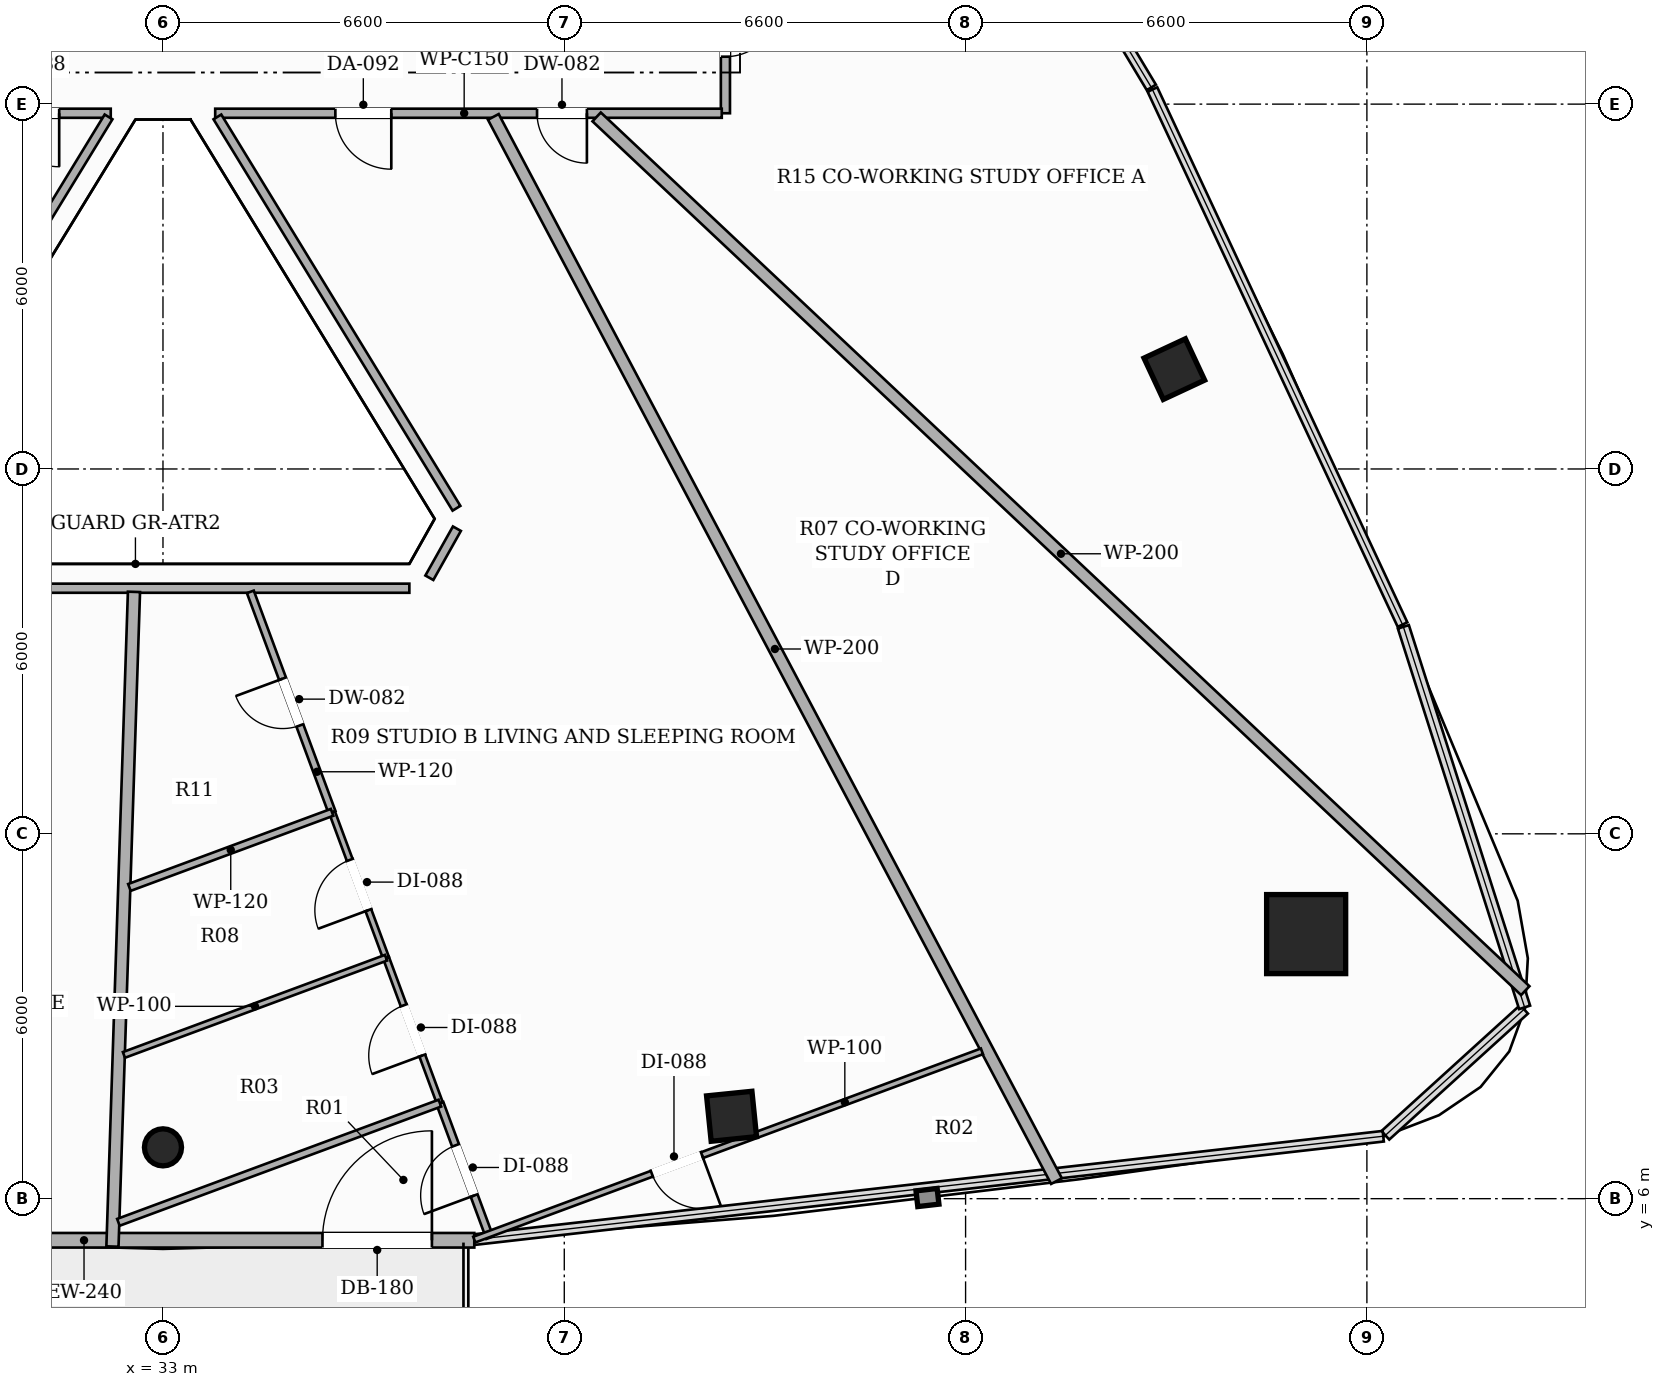
"""IFC4 building model, lengths in metres.
Left out: names, types, materials, properties, quantities, classifications, styles, units other than length and angle.
Written with IfcOpenShell. Run it as: python <this file> out.ifc"""

import sys

from ifc_helpers import new_model, si_unit, direction, frame, frame_2d, origin, origin_2d, place, context, subcontext, project, spatial, rectangle, hollow_rectangle, hollow_circle, extrude, element, fill, save


model = new_model("IFC4")
c1 = context("Model", 3, precision=1e-05, world=origin(), true_north=direction((0.0, 1.0)))
c2 = subcontext(c1, "Body", "Model", "MODEL_VIEW")
j1 = project(units=[si_unit("LENGTHUNIT", "METRE"), si_unit("PLANEANGLEUNIT", "RADIAN")], contexts=[c1])
p1 = place(None, origin())
s1 = spatial("IfcSite", under=j1, at=p1, CompositionType="ELEMENT")
p2 = place(p1, origin())
s2 = spatial("IfcBuilding", under=s1, at=p2, CompositionType="ELEMENT")
p3 = place(p2, frame((0.0, 0.0, 246.95)))
s3 = spatial("IfcBuildingStorey", under=s2, at=p3, CompositionType="ELEMENT", Elevation=246.95)
p4 = place(p3, frame((51.801, 10.351, 0.0), z_axis=(0.0, 0.0, 1.0), x_axis=(1.0, 0.0, 0.0)))
e1 = element("IfcColumn", 1, at=p4, inside=s3, PredefinedType="COLUMN", context=c2, shape_type="SweptSolid", body=[
    extrude(hollow_rectangle(XDim=1.3, YDim=1.3, WallThickness=0.04, at=origin_2d()), origin(), (0.0, 0.0, 1.0), 3.3),
])
p5 = place(p3, frame((33.0, 6.844, 0.0), z_axis=(0.0, 0.0, 1.0), x_axis=(1.0, 0.0, 0.0)))
e2 = element("IfcColumn", 2, at=p5, inside=s3, PredefinedType="COLUMN", context=c2, shape_type="SweptSolid", body=[
    extrude(hollow_circle(Radius=0.305, WallThickness=0.016, at=origin_2d()), origin(), (0.0, 0.0, 1.0), 3.3),
])
for number, where, z_axis, x_axis in (
    (3, (42.351, 7.355, 0.0), (0.0, 0.0, 1.0), (0.995, 0.101, 0.0)),
    (4, (49.633, 19.642, 0.0), (0.0, 0.0, 1.0), (-0.423, 0.906, 0.0)),
):
    element("IfcColumn", number, at=place(p3, frame(where, z_axis=z_axis, x_axis=x_axis)), inside=s3, PredefinedType="COLUMN", context=c2, shape_type="SweptSolid", body=[
        extrude(hollow_rectangle(XDim=0.75, YDim=0.75, WallThickness=0.025, at=origin_2d()), origin(), (0.0, 0.0, 1.0), 3.3),
    ])
p6 = place(p3, frame((27.88, 5.316, 0.0), z_axis=(0.0, 0.0, 1.0), x_axis=(1.0, 0.0, 0.0)))
e5 = element("IfcWall", 5, at=p6, inside=s3, PredefinedType="SOLIDWALL", context=c2, shape_type="SweptSolid", body=[
    extrude(rectangle(XDim=10.24, YDim=0.24, at=frame_2d((5.12, 0.0))), origin(), (0.0, 0.0, 1.0), 2.624),
])
p7 = place(p6, frame((7.743, 0.0, 0.0)))
e6 = element("IfcOpeningElement", 6, at=p7, cuts=e5, PredefinedType="OPENING", context=c2, shape_type="SweptSolid", body=[
    extrude(rectangle(XDim=1.8, YDim=2.2, at=frame_2d((0.9, 1.1))), frame((0.0, 0.13, 0.0), z_axis=(0.0, -1.0, 0.0), x_axis=(1.0, 0.0, 0.0)), (0.0, 0.0, 1.0), 0.26),
])
p8 = place(p3, frame((32.141, 23.85, 0.0), z_axis=(0.0, 0.0, 1.0), x_axis=(-1.0, 0.0, 0.0)))
e7 = element("IfcWall", 7, at=p8, inside=s3, PredefinedType="PARTITIONING", context=c2, shape_type="SweptSolid", body=[
    extrude(rectangle(XDim=8.491, YDim=0.15, at=frame_2d((4.246, 0.0))), origin(), (0.0, 0.0, 1.0), 2.565),
])
p9 = place(p8, frame((0.848, 0.0, 0.0)))
e8 = element("IfcOpeningElement", 8, at=p9, cuts=e7, PredefinedType="OPENING", context=c2, shape_type="SweptSolid", body=[
    extrude(rectangle(XDim=0.88, YDim=2.1, at=frame_2d((0.44, 1.05))), frame((0.0, 0.085, 0.0), z_axis=(0.0, -1.0, 0.0), x_axis=(1.0, 0.0, 0.0)), (0.0, 0.0, 1.0), 0.17),
])
p10 = place(p8, frame((2.616, 0.0, 0.0)))
e9 = element("IfcOpeningElement", 9, at=p10, cuts=e7, PredefinedType="OPENING", context=c2, shape_type="SweptSolid", body=[
    extrude(rectangle(XDim=0.88, YDim=2.1, at=frame_2d((0.44, 1.05))), frame((0.0, 0.085, 0.0), z_axis=(0.0, -1.0, 0.0), x_axis=(1.0, 0.0, 0.0)), (0.0, 0.0, 1.0), 0.17),
])
p11 = place(p8, frame((4.567, 0.0, 0.0)))
e10 = element("IfcOpeningElement", 10, at=p11, cuts=e7, PredefinedType="OPENING", context=c2, shape_type="SweptSolid", body=[
    extrude(rectangle(XDim=0.88, YDim=2.1, at=frame_2d((0.44, 1.05))), frame((0.0, 0.085, 0.0), z_axis=(0.0, -1.0, 0.0), x_axis=(1.0, 0.0, 0.0)), (0.0, 0.0, 1.0), 0.17),
])
p12 = place(p3, frame((42.25, 26.59, 0.0), z_axis=(0.0, 0.0, 1.0), x_axis=(0.0, -1.0, 0.0)))
e11 = element("IfcWall", 11, at=p12, inside=s3, PredefinedType="PARTITIONING", context=c2, shape_type="SweptSolid", body=[
    extrude(rectangle(XDim=2.74, YDim=0.15, at=frame_2d((1.37, 0.0))), origin(), (0.0, 0.0, 1.0), 2.773),
])
p13 = place(p12, frame((0.93, 0.0, 0.0)))
e12 = element("IfcOpeningElement", 12, at=p13, cuts=e11, PredefinedType="OPENING", context=c2, shape_type="SweptSolid", body=[
    extrude(rectangle(XDim=0.88, YDim=2.1, at=frame_2d((0.44, 1.05))), frame((0.0, 0.085, 0.0), z_axis=(0.0, -1.0, 0.0), x_axis=(1.0, 0.0, 0.0)), (0.0, 0.0, 1.0), 0.17),
])
p14 = place(p3, frame((42.19, 23.85, 0.0), z_axis=(0.0, 0.0, 1.0), x_axis=(-1.0, 0.0, 0.0)))
e13 = element("IfcWall", 13, at=p14, inside=s3, PredefinedType="PARTITIONING", context=c2, shape_type="SweptSolid", body=[
    extrude(rectangle(XDim=8.331, YDim=0.15, at=frame_2d((4.166, 0.0))), origin(), (0.0, 0.0, 1.0), 2.565),
])
p15 = place(p14, frame((5.435, 0.0, 0.0)))
e14 = element("IfcOpeningElement", 14, at=p15, cuts=e13, PredefinedType="OPENING", context=c2, shape_type="SweptSolid", body=[
    extrude(rectangle(XDim=0.92, YDim=2.15, at=frame_2d((0.46, 1.075))), frame((0.0, 0.085, 0.0), z_axis=(0.0, -1.0, 0.0), x_axis=(1.0, 0.0, 0.0)), (0.0, 0.0, 1.0), 0.17),
])
p16 = place(p14, frame((2.218, 0.0, 0.0)))
e15 = element("IfcOpeningElement", 15, at=p16, cuts=e13, PredefinedType="OPENING", context=c2, shape_type="SweptSolid", body=[
    extrude(rectangle(XDim=0.82, YDim=2.1, at=frame_2d((0.41, 1.05))), frame((0.0, 0.085, 0.0), z_axis=(0.0, -1.0, 0.0), x_axis=(1.0, 0.0, 0.0)), (0.0, 0.0, 1.0), 0.17),
])
p17 = place(p3, frame((33.895, 23.79, 0.0), z_axis=(0.0, 0.0, 1.0), x_axis=(0.521329541742, -0.85335544113, 0.0)))
e16 = element("IfcWall", 16, at=p17, inside=s3, PredefinedType="PARTITIONING", context=c2, shape_type="SweptSolid", body=[
    extrude(rectangle(XDim=7.542, YDim=0.15, at=frame_2d((3.771, 0.0))), origin(), (0.0, 0.0, 1.0), 2.773),
])
p18 = place(p3, frame((37.834, 17.018, 0.0), z_axis=(0.0, 0.0, 1.0), x_axis=(-0.489334167997, -0.872096366252, 0.0)))
e17 = element("IfcWall", 17, at=p18, inside=s3, PredefinedType="PARTITIONING", context=c2, shape_type="SweptSolid", body=[
    extrude(rectangle(XDim=0.926, YDim=0.15, at=frame_2d((0.463, 0.0))), origin(), (0.0, 0.0, 1.0), 3.06),
])
p19 = place(p3, frame((37.052, 16.039, 0.0), z_axis=(0.0, 0.0, 1.0), x_axis=(-1.0, 0.0, 0.0)))
e18 = element("IfcWall", 18, at=p19, inside=s3, PredefinedType="PARTITIONING", context=c2, shape_type="SweptSolid", body=[
    extrude(rectangle(XDim=8.104, YDim=0.15, at=frame_2d((4.052, 0.0))), origin(), (0.0, 0.0, 1.0), 2.773),
])
p20 = place(p3, frame((28.173, 17.354, 0.0), z_axis=(0.0, 0.0, 1.0), x_axis=(0.521329541742, 0.85335544113, 0.0)))
e19 = element("IfcWall", 19, at=p20, inside=s3, PredefinedType="PARTITIONING", context=c2, shape_type="SweptSolid", body=[
    extrude(rectangle(XDim=7.542, YDim=0.15, at=frame_2d((3.771, 0.0))), origin(), (0.0, 0.0, 1.0), 2.773),
])
p21 = place(p3, frame((55.405, 9.421, 0.0), z_axis=(0.0, 0.0, 1.0), x_axis=(-0.728328495468, 0.685228139155, 0.0)))
e20 = element("IfcWall", 20, at=p21, inside=s3, PredefinedType="PARTITIONING", context=c2, shape_type="SweptSolid", body=[
    extrude(rectangle(XDim=20.97, YDim=0.2, at=frame_2d((10.485, 0.0))), origin(), (0.0, 0.0, 1.0), 2.492),
])
p22 = place(p3, frame((38.433, 23.79, 0.0), z_axis=(0.0, 0.0, 1.0), x_axis=(0.467759118023, -0.88385598799, 0.0)))
e21 = element("IfcWall", 21, at=p22, inside=s3, PredefinedType="PARTITIONING", context=c2, shape_type="SweptSolid", body=[
    extrude(rectangle(XDim=19.801, YDim=0.2, at=frame_2d((9.9, 0.0))), origin(), (0.0, 0.0, 1.0), 2.492),
])
p23 = place(p3, frame((32.169, 5.213, 0.0), z_axis=(0.0, 0.0, 1.0), x_axis=(0.032863548895, 0.999459847695, 0.0)))
e22 = element("IfcWall", 22, at=p23, inside=s3, PredefinedType="PARTITIONING", context=c2, shape_type="SweptSolid", body=[
    extrude(rectangle(XDim=10.772, YDim=0.2, at=frame_2d((5.386, 0.0))), origin(), (0.0, 0.0, 1.0), 2.492),
])
p24 = place(p3, frame((35.781, 12.353, 0.0), z_axis=(0.0, 0.0, 1.0), x_axis=(-0.347550810428, 0.937661151041, 0.0)))
e23 = element("IfcWall", 23, at=p24, inside=s3, PredefinedType="PARTITIONING", context=c2, shape_type="SweptSolid", body=[
    extrude(rectangle(XDim=3.867, YDim=0.12, at=frame_2d((1.934, 0.0))), origin(), (0.0, 0.0, 1.0), 3.06),
])
p25 = place(p24, frame((1.524, 0.0, 0.0)))
e24 = element("IfcOpeningElement", 24, at=p25, cuts=e23, PredefinedType="OPENING", context=c2, shape_type="SweptSolid", body=[
    extrude(rectangle(XDim=0.82, YDim=2.1, at=frame_2d((0.41, 1.05))), frame((0.0, 0.07, 0.0), z_axis=(0.0, -1.0, 0.0), x_axis=(1.0, 0.0, 0.0)), (0.0, 0.0, 1.0), 0.14),
])
p26 = place(p3, frame((38.375, 5.358, 0.0), z_axis=(0.0, 0.0, 1.0), x_axis=(-0.347822952978, 0.937560234535, 0.0)))
e25 = element("IfcWall", 25, at=p26, inside=s3, PredefinedType="PARTITIONING", context=c2, shape_type="SweptSolid", body=[
    extrude(rectangle(XDim=2.361, YDim=0.12, at=frame_2d((1.18, 0.0))), origin(), (0.0, 0.0, 1.0), 2.492),
])
p27 = place(p26, frame((0.74, 0.0, 0.0)))
e26 = element("IfcOpeningElement", 26, at=p27, cuts=e25, PredefinedType="OPENING", context=c2, shape_type="SweptSolid", body=[
    extrude(rectangle(XDim=0.88, YDim=2.1, at=frame_2d((0.44, 1.05))), frame((0.0, 0.07, 0.0), z_axis=(0.0, -1.0, 0.0), x_axis=(1.0, 0.0, 0.0)), (0.0, 0.0, 1.0), 0.14),
])
p28 = place(p3, frame((37.554, 7.571, 0.0), z_axis=(0.0, 0.0, 1.0), x_axis=(-0.347479633163, 0.93768753033, 0.0)))
e27 = element("IfcWall", 27, at=p28, inside=s3, PredefinedType="PARTITIONING", context=c2, shape_type="SweptSolid", body=[
    extrude(rectangle(XDim=2.55, YDim=0.1, at=frame_2d((1.275, 0.0))), origin(), (0.0, 0.0, 1.0), 2.773),
])
p29 = place(p28, frame((0.835, 0.0, 0.0)))
e28 = element("IfcOpeningElement", 28, at=p29, cuts=e27, PredefinedType="OPENING", context=c2, shape_type="SweptSolid", body=[
    extrude(rectangle(XDim=0.88, YDim=2.1, at=frame_2d((0.44, 1.05))), frame((0.0, 0.06, 0.0), z_axis=(0.0, -1.0, 0.0), x_axis=(1.0, 0.0, 0.0)), (0.0, 0.0, 1.0), 0.12),
])
p30 = place(p3, frame((46.469, 8.423, 0.0), z_axis=(0.0, 0.0, 1.0), x_axis=(-0.937601832004, -0.34771080602, 0.0)))
e29 = element("IfcWall", 29, at=p30, inside=s3, PredefinedType="PARTITIONING", context=c2, shape_type="SweptSolid", body=[
    extrude(rectangle(XDim=8.905, YDim=0.1, at=frame_2d((4.452, 0.0))), origin(), (0.0, 0.0, 1.0), 2.492),
])
p31 = place(p30, frame((4.91, 0.0, 0.0)))
e30 = element("IfcOpeningElement", 30, at=p31, cuts=e29, PredefinedType="OPENING", context=c2, shape_type="SweptSolid", body=[
    extrude(rectangle(XDim=0.88, YDim=2.1, at=frame_2d((0.44, 1.05))), frame((0.0, 0.06, 0.0), z_axis=(0.0, -1.0, 0.0), x_axis=(1.0, 0.0, 0.0)), (0.0, 0.0, 1.0), 0.12),
])
p32 = place(p3, frame((36.668, 9.962, 0.0), z_axis=(0.0, 0.0, 1.0), x_axis=(-0.347785106968, 0.937574274056, 0.0)))
e31 = element("IfcWall", 31, at=p32, inside=s3, PredefinedType="PARTITIONING", context=c2, shape_type="SweptSolid", body=[
    extrude(rectangle(XDim=2.55, YDim=0.1, at=frame_2d((1.275, 0.0))), origin(), (0.0, 0.0, 1.0), 3.06),
])
p33 = place(p32, frame((0.835, 0.0, 0.0)))
e32 = element("IfcOpeningElement", 32, at=p33, cuts=e31, PredefinedType="OPENING", context=c2, shape_type="SweptSolid", body=[
    extrude(rectangle(XDim=0.88, YDim=2.1, at=frame_2d((0.44, 1.05))), frame((0.0, 0.06, 0.0), z_axis=(0.0, -1.0, 0.0), x_axis=(1.0, 0.0, 0.0)), (0.0, 0.0, 1.0), 0.12),
])
p34 = place(p3, frame((35.781, 12.353, 0.0), z_axis=(0.0, 0.0, 1.0), x_axis=(-0.937688263894, -0.347477653607, 0.0)))
e33 = element("IfcWall", 33, at=p34, inside=s3, PredefinedType="PARTITIONING", context=c2, shape_type="SweptSolid", body=[
    extrude(rectangle(XDim=3.554, YDim=0.12, at=frame_2d((1.777, 0.0))), origin(), (0.0, 0.0, 1.0), 2.773),
])
p35 = place(p3, frame((32.267, 5.611, 0.0), z_axis=(0.0, 0.0, 1.0), x_axis=(0.937641120959, 0.347604845027, 0.0)))
e34 = element("IfcWall", 34, at=p35, inside=s3, PredefinedType="PARTITIONING", context=c2, shape_type="SweptSolid", body=[
    extrude(rectangle(XDim=5.638, YDim=0.12, at=frame_2d((2.819, 0.0))), origin(), (0.0, 0.0, 1.0), 2.492),
])
p36 = place(p3, frame((32.358, 8.364, 0.0), z_axis=(0.0, 0.0, 1.0), x_axis=(0.937636593966, 0.34761705605, 0.0)))
e35 = element("IfcWall", 35, at=p36, inside=s3, PredefinedType="PARTITIONING", context=c2, shape_type="SweptSolid", body=[
    extrude(rectangle(XDim=4.597, YDim=0.1, at=frame_2d((2.298, 0.0))), origin(), (0.0, 0.0, 1.0), 2.773),
])
p37 = place(p7, origin())
e36 = element("IfcDoor", 36, at=p37, inside=s3, OperationType="SINGLE_SWING_RIGHT", PredefinedType="DOOR", context=c2, shape_type="SweptSolid", body=[
    extrude(rectangle(XDim=1.8, YDim=2.2, at=frame_2d((0.9, 1.1))), frame((0.0, 0.025, 0.0), z_axis=(0.0, -1.0, 0.0), x_axis=(1.0, 0.0, 0.0)), (0.0, 0.0, 1.0), 0.05),
])
fill(e6, e36)
p38 = place(p13, origin())
e37 = element("IfcDoor", 37, at=p38, inside=s3, OperationType="SINGLE_SWING_LEFT", PredefinedType="DOOR", context=c2, shape_type="SweptSolid", body=[
    extrude(rectangle(XDim=0.88, YDim=2.1, at=frame_2d((0.44, 1.05))), frame((0.0, 0.025, 0.0), z_axis=(0.0, -1.0, 0.0), x_axis=(1.0, 0.0, 0.0)), (0.0, 0.0, 1.0), 0.05),
])
fill(e12, e37)
p39 = place(p15, origin())
e38 = element("IfcDoor", 38, at=p39, inside=s3, OperationType="SINGLE_SWING_LEFT", PredefinedType="DOOR", context=c2, shape_type="SweptSolid", body=[
    extrude(rectangle(XDim=0.92, YDim=2.15, at=frame_2d((0.46, 1.075))), frame((0.0, 0.025, 0.0), z_axis=(0.0, -1.0, 0.0), x_axis=(1.0, 0.0, 0.0)), (0.0, 0.0, 1.0), 0.05),
])
fill(e14, e38)
p40 = place(p25, origin())
e39 = element("IfcDoor", 39, at=p40, inside=s3, OperationType="SINGLE_SWING_RIGHT", PredefinedType="DOOR", context=c2, shape_type="SweptSolid", body=[
    extrude(rectangle(XDim=0.82, YDim=2.1, at=frame_2d((0.41, 1.05))), frame((0.0, 0.025, 0.0), z_axis=(0.0, -1.0, 0.0), x_axis=(1.0, 0.0, 0.0)), (0.0, 0.0, 1.0), 0.05),
])
fill(e24, e39)
p41 = place(p27, origin())
e40 = element("IfcDoor", 40, at=p41, inside=s3, OperationType="SINGLE_SWING_LEFT", PredefinedType="DOOR", context=c2, shape_type="SweptSolid", body=[
    extrude(rectangle(XDim=0.88, YDim=2.1, at=frame_2d((0.44, 1.05))), frame((0.0, 0.025, 0.0), z_axis=(0.0, -1.0, 0.0), x_axis=(1.0, 0.0, 0.0)), (0.0, 0.0, 1.0), 0.05),
])
fill(e26, e40)
p42 = place(p29, origin())
e41 = element("IfcDoor", 41, at=p42, inside=s3, OperationType="SINGLE_SWING_LEFT", PredefinedType="DOOR", context=c2, shape_type="SweptSolid", body=[
    extrude(rectangle(XDim=0.88, YDim=2.1, at=frame_2d((0.44, 1.05))), frame((0.0, 0.025, 0.0), z_axis=(0.0, -1.0, 0.0), x_axis=(1.0, 0.0, 0.0)), (0.0, 0.0, 1.0), 0.05),
])
fill(e28, e41)
p43 = place(p31, origin())
e42 = element("IfcDoor", 42, at=p43, inside=s3, OperationType="SINGLE_SWING_LEFT", PredefinedType="DOOR", context=c2, shape_type="SweptSolid", body=[
    extrude(rectangle(XDim=0.88, YDim=2.1, at=frame_2d((0.44, 1.05))), frame((0.0, 0.025, 0.0), z_axis=(0.0, -1.0, 0.0), x_axis=(1.0, 0.0, 0.0)), (0.0, 0.0, 1.0), 0.05),
])
fill(e30, e42)
p44 = place(p33, origin())
e43 = element("IfcDoor", 43, at=p44, inside=s3, OperationType="SINGLE_SWING_LEFT", PredefinedType="DOOR", context=c2, shape_type="SweptSolid", body=[
    extrude(rectangle(XDim=0.88, YDim=2.1, at=frame_2d((0.44, 1.05))), frame((0.0, 0.025, 0.0), z_axis=(0.0, -1.0, 0.0), x_axis=(1.0, 0.0, 0.0)), (0.0, 0.0, 1.0), 0.05),
])
fill(e32, e43)
p45 = place(p16, origin())
e44 = element("IfcDoor", 44, at=p45, inside=s3, OperationType="SINGLE_SWING_LEFT", PredefinedType="DOOR", context=c2, shape_type="SweptSolid", body=[
    extrude(rectangle(XDim=0.82, YDim=2.1, at=frame_2d((0.41, 1.05))), frame((0.0, 0.025, 0.0), z_axis=(0.0, -1.0, 0.0), x_axis=(1.0, 0.0, 0.0)), (0.0, 0.0, 1.0), 0.05),
])
fill(e15, e44)
p46 = place(p9, origin())
e45 = element("IfcDoor", 45, at=p46, inside=s3, OperationType="SINGLE_SWING_LEFT", PredefinedType="DOOR", context=c2, shape_type="SweptSolid", body=[
    extrude(rectangle(XDim=0.88, YDim=2.1, at=frame_2d((0.44, 1.05))), frame((0.0, 0.025, 0.0), z_axis=(0.0, -1.0, 0.0), x_axis=(1.0, 0.0, 0.0)), (0.0, 0.0, 1.0), 0.05),
])
fill(e8, e45)
save(model, sys.argv[1])
